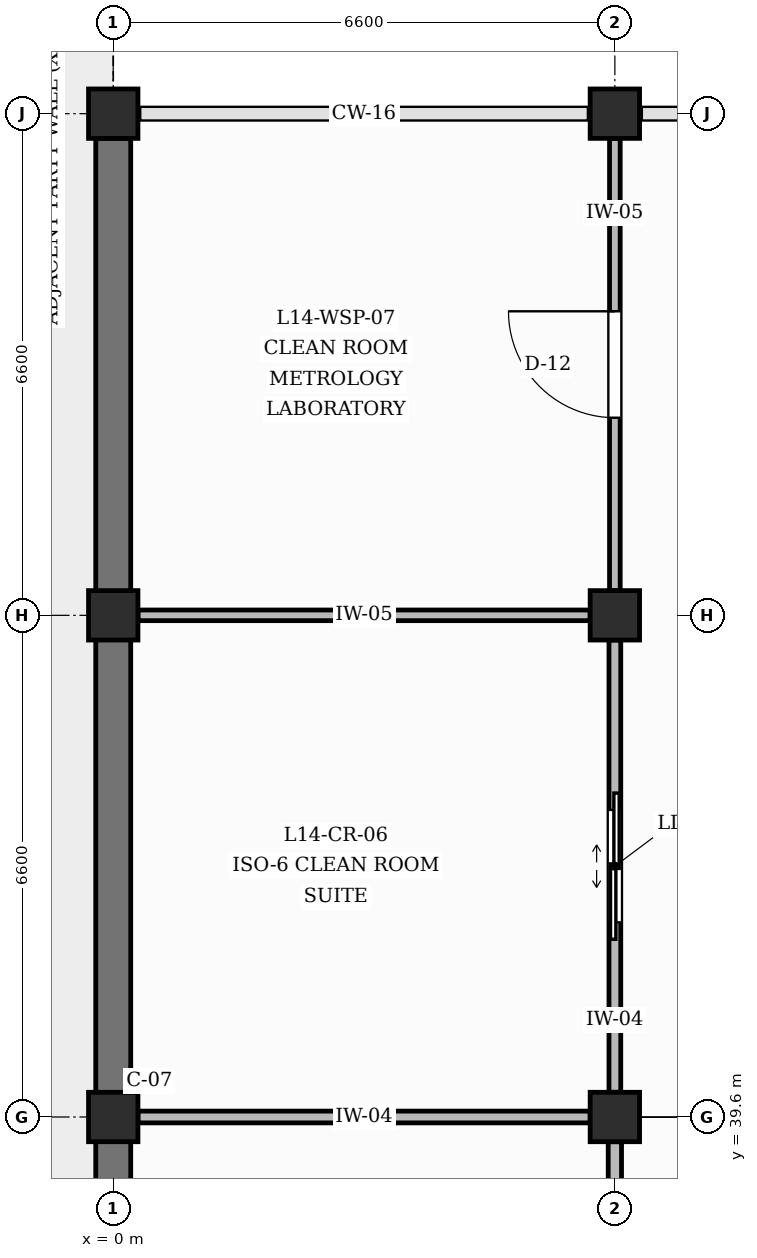
"""IFC4 building model, lengths in metres.
Left out: names, types, materials, properties, quantities, classifications, styles, units other than length and angle.
Written with IfcOpenShell. Run it as: python <this file> out.ifc"""

import sys

from ifc_helpers import new_model, si_unit, direction, frame, frame_2d, origin, origin_2d, place, context, subcontext, project, spatial, rectangle, extrude, element, fill, save


model = new_model("IFC4")
c1 = context("Model", 3, precision=1e-05, world=origin(), true_north=direction((0.0, 1.0)))
c2 = subcontext(c1, "Body", "Model", "MODEL_VIEW")
j1 = project(units=[si_unit("LENGTHUNIT", "METRE"), si_unit("PLANEANGLEUNIT", "RADIAN")], contexts=[c1])
p1 = place(None, origin())
s1 = spatial("IfcSite", under=j1, at=p1, CompositionType="ELEMENT")
p2 = place(p1, origin())
s2 = spatial("IfcBuilding", under=s1, at=p2, CompositionType="ELEMENT")
p3 = place(p2, frame((0.0, 0.0, 60.6)))
s3 = spatial("IfcBuildingStorey", under=s2, at=p3, CompositionType="ELEMENT", Elevation=60.6)
for number, where, z_axis, x_axis in (
    (1, (0.0, 39.6, 0.0), (0.0, 0.0, 1.0), (1.0, 0.0, 0.0)),
    (2, (0.0, 46.2, 0.0), (0.0, 0.0, 1.0), (1.0, 0.0, 0.0)),
    (3, (0.0, 52.8, 0.0), (0.0, 0.0, 1.0), (1.0, 0.0, 0.0)),
    (4, (6.6, 39.6, 0.0), (0.0, 0.0, 1.0), (1.0, 0.0, 0.0)),
    (5, (6.6, 46.2, 0.0), (0.0, 0.0, 1.0), (1.0, 0.0, 0.0)),
    (6, (6.6, 52.8, 0.0), (0.0, 0.0, 1.0), (1.0, 0.0, 0.0)),
):
    element("IfcColumn", number, at=place(p3, frame(where, z_axis=z_axis, x_axis=x_axis)), inside=s3, PredefinedType="COLUMN", context=c2, shape_type="SweptSolid", body=[
        extrude(rectangle(XDim=0.65, YDim=0.65, at=origin_2d()), origin(), (0.0, 0.0, 1.0), 4.2),
    ])
for number, where, z_axis, x_axis in (
    (7, (0.0, 33.325, 0.0), (0.0, 0.0, 1.0), (0.0, 1.0, 0.0)),
    (8, (0.0, 39.925, 0.0), (0.0, 0.0, 1.0), (0.0, 1.0, 0.0)),
):
    element("IfcWall", number, at=place(p3, frame(where, z_axis=z_axis, x_axis=x_axis)), inside=s3, PredefinedType="SOLIDWALL", context=c2, shape_type="SweptSolid", body=[
        extrude(rectangle(XDim=5.95, YDim=0.46, at=frame_2d((2.975, 0.0))), origin(), (0.0, 0.0, 1.0), 3.31),
    ])
p4 = place(p3, frame((0.0, 46.525, 0.0), z_axis=(0.0, 0.0, 1.0), x_axis=(0.0, 1.0, 0.0)))
e9 = element("IfcWall", 9, at=p4, inside=s3, PredefinedType="SOLIDWALL", context=c2, shape_type="SweptSolid", body=[
    extrude(rectangle(XDim=5.95, YDim=0.46, at=frame_2d((2.975, 0.0))), origin(), (0.0, 0.0, 1.0), 3.31),
])
p5 = place(p3, frame((6.6, 33.325, 0.0), z_axis=(0.0, 0.0, 1.0), x_axis=(0.0, 1.0, 0.0)))
e10 = element("IfcWall", 10, at=p5, inside=s3, PredefinedType="PARTITIONING", context=c2, shape_type="SweptSolid", body=[
    extrude(rectangle(XDim=5.95, YDim=0.175, at=frame_2d((2.975, 0.0))), origin(), (0.0, 0.0, 1.0), 3.31),
])
p6 = place(p5, frame((2.315, 0.0, 0.0)))
e11 = element("IfcOpeningElement", 11, at=p6, cuts=e10, PredefinedType="OPENING", context=c2, shape_type="SweptSolid", body=[
    extrude(rectangle(XDim=1.32, YDim=2.2, at=frame_2d((0.66, 1.1))), frame((0.0, 0.097, 0.0), z_axis=(0.0, -1.0, 0.0), x_axis=(1.0, 0.0, 0.0)), (0.0, 0.0, 1.0), 0.195),
])
p7 = place(p3, frame((0.325, 39.6, 0.0), z_axis=(0.0, 0.0, 1.0), x_axis=(1.0, 0.0, 0.0)))
e12 = element("IfcWall", 12, at=p7, inside=s3, PredefinedType="PARTITIONING", context=c2, shape_type="SweptSolid", body=[
    extrude(rectangle(XDim=5.95, YDim=0.155, at=frame_2d((2.975, 0.0))), origin(), (0.0, 0.0, 1.0), 3.31),
])
p8 = place(p3, frame((6.6, 39.925, 0.0), z_axis=(0.0, 0.0, 1.0), x_axis=(0.0, 1.0, 0.0)))
e13 = element("IfcWall", 13, at=p8, inside=s3, PredefinedType="PARTITIONING", context=c2, shape_type="SweptSolid", body=[
    extrude(rectangle(XDim=5.95, YDim=0.155, at=frame_2d((2.975, 0.0))), origin(), (0.0, 0.0, 1.0), 3.31),
])
p9 = place(p8, frame((2.235, 0.0, 0.0)))
e14 = element("IfcOpeningElement", 14, at=p9, cuts=e13, PredefinedType="OPENING", context=c2, shape_type="SweptSolid", body=[
    extrude(rectangle(XDim=1.48, YDim=2.25, at=frame_2d((0.74, 1.125))), frame((0.0, 0.087, 0.0), z_axis=(0.0, -1.0, 0.0), x_axis=(1.0, 0.0, 0.0)), (0.0, 0.0, 1.0), 0.175),
])
p10 = place(p3, frame((0.325, 46.2, 0.0), z_axis=(0.0, 0.0, 1.0), x_axis=(1.0, 0.0, 0.0)))
e15 = element("IfcWall", 15, at=p10, inside=s3, PredefinedType="PARTITIONING", context=c2, shape_type="SweptSolid", body=[
    extrude(rectangle(XDim=5.95, YDim=0.14, at=frame_2d((2.975, 0.0))), origin(), (0.0, 0.0, 1.0), 3.31),
])
p11 = place(p3, frame((6.6, 46.525, 0.0), z_axis=(0.0, 0.0, 1.0), x_axis=(0.0, 1.0, 0.0)))
e16 = element("IfcWall", 16, at=p11, inside=s3, PredefinedType="PARTITIONING", context=c2, shape_type="SweptSolid", body=[
    extrude(rectangle(XDim=5.95, YDim=0.14, at=frame_2d((2.975, 0.0))), origin(), (0.0, 0.0, 1.0), 3.31),
])
p12 = place(p11, frame((2.275, 0.0, 0.0)))
e17 = element("IfcOpeningElement", 17, at=p12, cuts=e16, PredefinedType="OPENING", context=c2, shape_type="SweptSolid", body=[
    extrude(rectangle(XDim=1.4, YDim=2.25, at=frame_2d((0.7, 1.125))), frame((0.0, 0.08, 0.0), z_axis=(0.0, -1.0, 0.0), x_axis=(1.0, 0.0, 0.0)), (0.0, 0.0, 1.0), 0.16),
])
p13 = place(p9, origin())
e18 = element("IfcDoor", 18, at=p13, inside=s3, OperationType="DOUBLE_DOOR_SLIDING", PredefinedType="USERDEFINED", context=c2, shape_type="SweptSolid", body=[
    extrude(rectangle(XDim=1.48, YDim=2.25, at=frame_2d((0.74, 1.125))), frame((0.0, 0.025, 0.0), z_axis=(0.0, -1.0, 0.0), x_axis=(1.0, 0.0, 0.0)), (0.0, 0.0, 1.0), 0.05),
])
fill(e14, e18)
p14 = place(p12, origin())
e19 = element("IfcDoor", 19, at=p14, inside=s3, OperationType="SINGLE_SWING_RIGHT", PredefinedType="DOOR", context=c2, shape_type="SweptSolid", body=[
    extrude(rectangle(XDim=1.4, YDim=2.25, at=frame_2d((0.7, 1.125))), frame((0.0, 0.025, 0.0), z_axis=(0.0, -1.0, 0.0), x_axis=(1.0, 0.0, 0.0)), (0.0, 0.0, 1.0), 0.05),
])
fill(e17, e19)
save(model, sys.argv[1])
